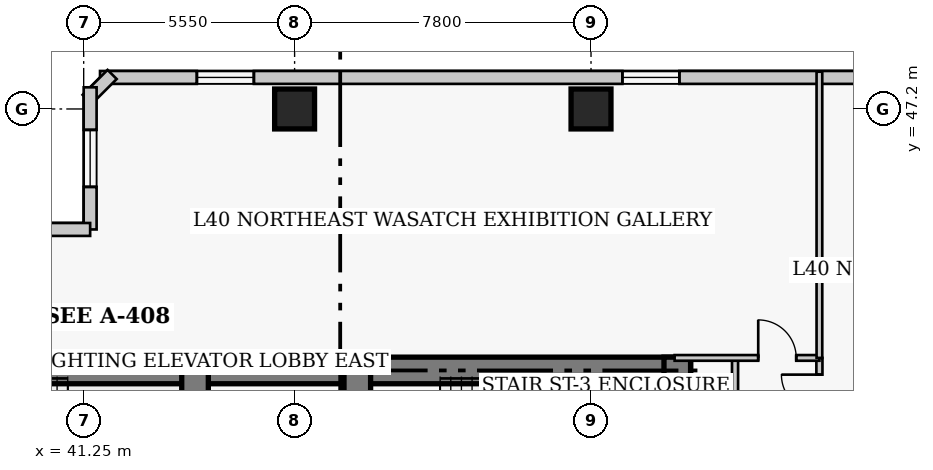
"""IFC4 building model, lengths in metres.
Left out: names, types, materials, properties, quantities, classifications, styles, units other than length and angle.
Written with IfcOpenShell. Run it as: python <this file> out.ifc"""

import sys

from ifc_helpers import new_model, si_unit, direction, frame, frame_2d, origin, origin_2d, place, context, subcontext, project, spatial, rectangle, extrude, element, fill, save


model = new_model("IFC4")
c1 = context("Model", 3, precision=1e-05, world=origin(), true_north=direction((0.0, 1.0)))
c2 = subcontext(c1, "Body", "Model", "MODEL_VIEW")
j1 = project(units=[si_unit("LENGTHUNIT", "METRE"), si_unit("PLANEANGLEUNIT", "RADIAN")], contexts=[c1])
p1 = place(None, origin())
s1 = spatial("IfcSite", under=j1, at=p1, CompositionType="ELEMENT")
p2 = place(p1, origin())
s2 = spatial("IfcBuilding", under=s1, at=p2, CompositionType="ELEMENT")
p3 = place(p2, frame((0.0, 0.0, 161.2)))
s3 = spatial("IfcBuildingStorey", under=s2, at=p3, CompositionType="ELEMENT", Elevation=161.2)
p4 = place(p3, frame((35.85, 40.32, 0.0), z_axis=(0.0, 0.0, 1.0), x_axis=(1.0, 0.0, 0.0)))
e1 = element("IfcWall", 1, at=p4, inside=s3, PredefinedType="SHEAR", context=c2, shape_type="SweptSolid", body=[
    extrude(rectangle(XDim=12.6, YDim=0.7, at=frame_2d((6.3, 0.0))), origin(), (0.0, 0.0, 1.0), 3.8),
])
p5 = place(p3, frame((48.45, 40.32, 0.0), z_axis=(0.0, 0.0, 1.0), x_axis=(1.0, 0.0, 0.0)))
e2 = element("IfcWall", 2, at=p5, inside=s3, PredefinedType="SHEAR", context=c2, shape_type="SweptSolid", body=[
    extrude(rectangle(XDim=8.77, YDim=0.7, at=frame_2d((4.385, 0.0))), origin(), (0.0, 0.0, 1.0), 3.8),
])
p6 = place(p3, frame((56.87, 27.05, 0.0), z_axis=(0.0, 0.0, 1.0), x_axis=(0.0, 1.0, 0.0)))
e3 = element("IfcWall", 3, at=p6, inside=s3, PredefinedType="SHEAR", context=c2, shape_type="SweptSolid", body=[
    extrude(rectangle(XDim=13.62, YDim=0.7, at=frame_2d((6.81, 0.0))), origin(), (0.0, 0.0, 1.0), 3.8),
])
p7 = place(p3, frame((44.18, 36.37, 0.0), z_axis=(0.0, 0.0, 1.0), x_axis=(0.0, 1.0, 0.0)))
e4 = element("IfcWall", 4, at=p7, inside=s3, PredefinedType="SHEAR", context=c2, shape_type="SweptSolid", body=[
    extrude(rectangle(XDim=3.95, YDim=0.7, at=frame_2d((1.975, 0.0))), origin(), (0.0, 0.0, 1.0), 3.8),
])
p8 = place(p3, frame((48.45, 32.4, 0.0), z_axis=(0.0, 0.0, 1.0), x_axis=(0.0, 1.0, 0.0)))
e5 = element("IfcWall", 5, at=p8, inside=s3, PredefinedType="SHEAR", context=c2, shape_type="SweptSolid", body=[
    extrude(rectangle(XDim=7.92, YDim=0.7, at=frame_2d((3.96, 0.0))), origin(), (0.0, 0.0, 1.0), 3.8),
])
p9 = place(p8, frame((5.8, 0.0, 0.0)))
e6 = element("IfcOpeningElement", 6, at=p9, cuts=e5, PredefinedType="OPENING", context=c2, shape_type="SweptSolid", body=[
    extrude(rectangle(XDim=1.1, YDim=2.15, at=frame_2d((0.55, 1.075))), frame((0.0, 0.36, 0.0), z_axis=(0.0, -1.0, 0.0), x_axis=(1.0, 0.0, 0.0)), (0.0, 0.0, 1.0), 0.72),
])
for number, where, z_axis, x_axis in (
    (7, (46.8, 47.2, 0.0), (0.0, 0.0, 1.0), (1.0, 0.0, 0.0)),
    (8, (54.6, 47.2, 0.0), (0.0, 0.0, 1.0), (1.0, 0.0, 0.0)),
):
    element("IfcColumn", number, at=place(p3, frame(where, z_axis=z_axis, x_axis=x_axis)), inside=s3, PredefinedType="COLUMN", context=c2, shape_type="SweptSolid", body=[
        extrude(rectangle(XDim=1.05, YDim=1.05, at=origin_2d()), origin(), (0.0, 0.0, 1.0), 3.8),
    ])
p10 = place(p3, frame((68.37, 48.03, 0.0), z_axis=(0.0, 0.0, 1.0), x_axis=(-1.0, 0.0, 0.0)))
e9 = element("IfcWall", 9, at=p10, inside=s3, PredefinedType="SOLIDWALL", context=c2, shape_type="SweptSolid", body=[
    extrude(rectangle(XDim=26.69, YDim=0.34, at=frame_2d((13.345, 0.0))), origin(), (0.0, 0.0, 1.0), 3.55),
])
p11 = place(p10, frame((3.048, 0.0, 0.85)))
e10 = element("IfcOpeningElement", 10, at=p11, cuts=e9, PredefinedType="OPENING", context=c2, shape_type="SweptSolid", body=[
    extrude(rectangle(XDim=1.5, YDim=1.75, at=frame_2d((0.75, 0.875))), frame((0.0, 0.18, 0.0), z_axis=(0.0, -1.0, 0.0), x_axis=(1.0, 0.0, 0.0)), (0.0, 0.0, 1.0), 0.36),
])
p12 = place(p10, frame((11.445, 0.0, 0.85)))
e11 = element("IfcOpeningElement", 11, at=p12, cuts=e9, PredefinedType="OPENING", context=c2, shape_type="SweptSolid", body=[
    extrude(rectangle(XDim=1.5, YDim=1.75, at=frame_2d((0.75, 0.875))), frame((0.0, 0.18, 0.0), z_axis=(0.0, -1.0, 0.0), x_axis=(1.0, 0.0, 0.0)), (0.0, 0.0, 1.0), 0.36),
])
p13 = place(p10, frame((22.642, 0.0, 0.85)))
e12 = element("IfcOpeningElement", 12, at=p13, cuts=e9, PredefinedType="OPENING", context=c2, shape_type="SweptSolid", body=[
    extrude(rectangle(XDim=1.5, YDim=1.75, at=frame_2d((0.75, 0.875))), frame((0.0, 0.18, 0.0), z_axis=(0.0, -1.0, 0.0), x_axis=(1.0, 0.0, 0.0)), (0.0, 0.0, 1.0), 0.36),
])
p14 = place(p3, frame((41.999, 48.108, 0.0), z_axis=(0.0, 0.0, 1.0), x_axis=(-0.707106781187, -0.707106781187, 0.0)))
e13 = element("IfcWall", 13, at=p14, inside=s3, PredefinedType="SOLIDWALL", context=c2, shape_type="SweptSolid", body=[
    extrude(rectangle(XDim=0.929, YDim=0.34, at=frame_2d((0.464, 0.0))), origin(), (0.0, 0.0, 1.0), 3.55),
])
p15 = place(p3, frame((41.42, 47.77, 0.0), z_axis=(0.0, 0.0, 1.0), x_axis=(0.0, -1.0, 0.0)))
e14 = element("IfcWall", 14, at=p15, inside=s3, PredefinedType="SOLIDWALL", context=c2, shape_type="SweptSolid", body=[
    extrude(rectangle(XDim=3.74, YDim=0.34, at=frame_2d((1.87, 0.0))), origin(), (0.0, 0.0, 1.0), 3.55),
])
p16 = place(p15, frame((1.12, 0.0, 0.85)))
e15 = element("IfcOpeningElement", 15, at=p16, cuts=e14, PredefinedType="OPENING", context=c2, shape_type="SweptSolid", body=[
    extrude(rectangle(XDim=1.5, YDim=1.75, at=frame_2d((0.75, 0.875))), frame((0.0, 0.18, 0.0), z_axis=(0.0, -1.0, 0.0), x_axis=(1.0, 0.0, 0.0)), (0.0, 0.0, 1.0), 0.36),
])
p17 = place(p3, frame((41.42, 44.03, 0.0), z_axis=(0.0, 0.0, 1.0), x_axis=(-1.0, 0.0, 0.0)))
e16 = element("IfcWall", 16, at=p17, inside=s3, PredefinedType="SOLIDWALL", context=c2, shape_type="SweptSolid", body=[
    extrude(rectangle(XDim=4.84, YDim=0.34, at=frame_2d((2.42, 0.0))), origin(), (0.0, 0.0, 1.0), 3.55),
])
p18 = place(p17, frame((1.67, 0.0, 0.85)))
e17 = element("IfcOpeningElement", 17, at=p18, cuts=e16, PredefinedType="OPENING", context=c2, shape_type="SweptSolid", body=[
    extrude(rectangle(XDim=1.5, YDim=1.75, at=frame_2d((0.75, 0.875))), frame((0.0, 0.18, 0.0), z_axis=(0.0, -1.0, 0.0), x_axis=(1.0, 0.0, 0.0)), (0.0, 0.0, 1.0), 0.36),
])
p19 = place(p3, frame((60.61, 12.05, 0.0), z_axis=(0.0, 0.0, 1.0), x_axis=(0.0, 1.0, 0.0)))
e18 = element("IfcWall", 18, at=p19, inside=s3, PredefinedType="PARTITIONING", context=c2, shape_type="SweptSolid", body=[
    extrude(rectangle(XDim=28.6, YDim=0.16, at=frame_2d((14.3, 0.0))), origin(), (0.0, 0.0, 1.0), 3.55),
])
p20 = place(p19, frame((3.5, 0.0, 0.0)))
e19 = element("IfcOpeningElement", 19, at=p20, cuts=e18, PredefinedType="OPENING", context=c2, shape_type="SweptSolid", body=[
    extrude(rectangle(XDim=0.95, YDim=2.1, at=frame_2d((0.475, 1.05))), frame((0.0, 0.09, 0.0), z_axis=(0.0, -1.0, 0.0), x_axis=(1.0, 0.0, 0.0)), (0.0, 0.0, 1.0), 0.18),
])
p21 = place(p19, frame((11.875, 0.0, 0.0)))
e20 = element("IfcOpeningElement", 20, at=p21, cuts=e18, PredefinedType="OPENING", context=c2, shape_type="SweptSolid", body=[
    extrude(rectangle(XDim=0.95, YDim=2.1, at=frame_2d((0.475, 1.05))), frame((0.0, 0.09, 0.0), z_axis=(0.0, -1.0, 0.0), x_axis=(1.0, 0.0, 0.0)), (0.0, 0.0, 1.0), 0.18),
])
p22 = place(p19, frame((20.325, 0.0, 0.0)))
e21 = element("IfcOpeningElement", 21, at=p22, cuts=e18, PredefinedType="OPENING", context=c2, shape_type="SweptSolid", body=[
    extrude(rectangle(XDim=0.95, YDim=2.1, at=frame_2d((0.475, 1.05))), frame((0.0, 0.09, 0.0), z_axis=(0.0, -1.0, 0.0), x_axis=(1.0, 0.0, 0.0)), (0.0, 0.0, 1.0), 0.18),
])
p23 = place(p19, frame((27.16, 0.0, 0.0)))
e22 = element("IfcOpeningElement", 22, at=p23, cuts=e18, PredefinedType="OPENING", context=c2, shape_type="SweptSolid", body=[
    extrude(rectangle(XDim=1.0, YDim=2.15, at=frame_2d((0.5, 1.075))), frame((0.0, 0.09, 0.0), z_axis=(0.0, -1.0, 0.0), x_axis=(1.0, 0.0, 0.0)), (0.0, 0.0, 1.0), 0.18),
])
p24 = place(p3, frame((58.39, 16.51, 0.0), z_axis=(0.0, 0.0, 1.0), x_axis=(0.0, 1.0, 0.0)))
e23 = element("IfcWall", 23, at=p24, inside=s3, PredefinedType="PARTITIONING", context=c2, shape_type="SweptSolid", body=[
    extrude(rectangle(XDim=24.14, YDim=0.16, at=frame_2d((12.07, 0.0))), origin(), (0.0, 0.0, 1.0), 3.093),
])
p25 = place(p3, frame((56.8, 40.65, 0.0), z_axis=(0.0, 0.0, 1.0), x_axis=(1.0, 0.0, 0.0)))
e24 = element("IfcWall", 24, at=p25, inside=s3, PredefinedType="PARTITIONING", context=c2, shape_type="SweptSolid", body=[
    extrude(rectangle(XDim=3.81, YDim=0.15, at=frame_2d((1.905, 0.0))), origin(), (0.0, 0.0, 1.0), 3.55),
])
p26 = place(p25, frame((2.2, 0.0, 0.0)))
e25 = element("IfcOpeningElement", 25, at=p26, cuts=e24, PredefinedType="OPENING", context=c2, shape_type="SweptSolid", body=[
    extrude(rectangle(XDim=1.0, YDim=2.15, at=frame_2d((0.5, 1.075))), frame((0.0, 0.085, 0.0), z_axis=(0.0, -1.0, 0.0), x_axis=(1.0, 0.0, 0.0)), (0.0, 0.0, 1.0), 0.17),
])
p27 = place(p3, frame((60.61, 40.65, 0.0), z_axis=(0.0, 0.0, 1.0), x_axis=(0.0, 1.0, 0.0)))
e26 = element("IfcWall", 26, at=p27, inside=s3, PredefinedType="PARTITIONING", context=c2, shape_type="SweptSolid", body=[
    extrude(rectangle(XDim=7.53, YDim=0.15, at=frame_2d((3.765, 0.0))), origin(), (0.0, 0.0, 1.0), 3.55),
])
p28 = place(p12, origin())
e27 = element("IfcWindow", 27, at=p28, inside=s3, PartitioningType="SINGLE_PANEL", PredefinedType="WINDOW", context=c2, shape_type="SweptSolid", body=[
    extrude(rectangle(XDim=1.5, YDim=1.75, at=frame_2d((0.75, 0.875))), frame((0.0, 0.03, 0.0), z_axis=(0.0, -1.0, 0.0), x_axis=(1.0, 0.0, 0.0)), (0.0, 0.0, 1.0), 0.06),
])
fill(e11, e27)
p29 = place(p13, origin())
e28 = element("IfcWindow", 28, at=p29, inside=s3, PartitioningType="SINGLE_PANEL", PredefinedType="WINDOW", context=c2, shape_type="SweptSolid", body=[
    extrude(rectangle(XDim=1.5, YDim=1.75, at=frame_2d((0.75, 0.875))), frame((0.0, 0.03, 0.0), z_axis=(0.0, -1.0, 0.0), x_axis=(1.0, 0.0, 0.0)), (0.0, 0.0, 1.0), 0.06),
])
fill(e12, e28)
p30 = place(p16, origin())
e29 = element("IfcWindow", 29, at=p30, inside=s3, PartitioningType="SINGLE_PANEL", PredefinedType="WINDOW", context=c2, shape_type="SweptSolid", body=[
    extrude(rectangle(XDim=1.5, YDim=1.75, at=frame_2d((0.75, 0.875))), frame((0.0, 0.03, 0.0), z_axis=(0.0, -1.0, 0.0), x_axis=(1.0, 0.0, 0.0)), (0.0, 0.0, 1.0), 0.06),
])
fill(e15, e29)
p31 = place(p26, origin())
e30 = element("IfcDoor", 30, at=p31, inside=s3, OperationType="SINGLE_SWING_LEFT", PredefinedType="DOOR", context=c2, shape_type="SweptSolid", body=[
    extrude(rectangle(XDim=1.0, YDim=2.15, at=frame_2d((0.5, 1.075))), frame((0.0, 0.025, 0.0), z_axis=(0.0, -1.0, 0.0), x_axis=(1.0, 0.0, 0.0)), (0.0, 0.0, 1.0), 0.05),
])
fill(e25, e30)
p32 = place(p23, origin())
e31 = element("IfcDoor", 31, at=p32, inside=s3, OperationType="SINGLE_SWING_RIGHT", PredefinedType="DOOR", context=c2, shape_type="SweptSolid", body=[
    extrude(rectangle(XDim=1.0, YDim=2.15, at=frame_2d((0.5, 1.075))), frame((0.0, 0.025, 0.0), z_axis=(0.0, -1.0, 0.0), x_axis=(1.0, 0.0, 0.0)), (0.0, 0.0, 1.0), 0.05),
])
fill(e22, e31)
save(model, sys.argv[1])
